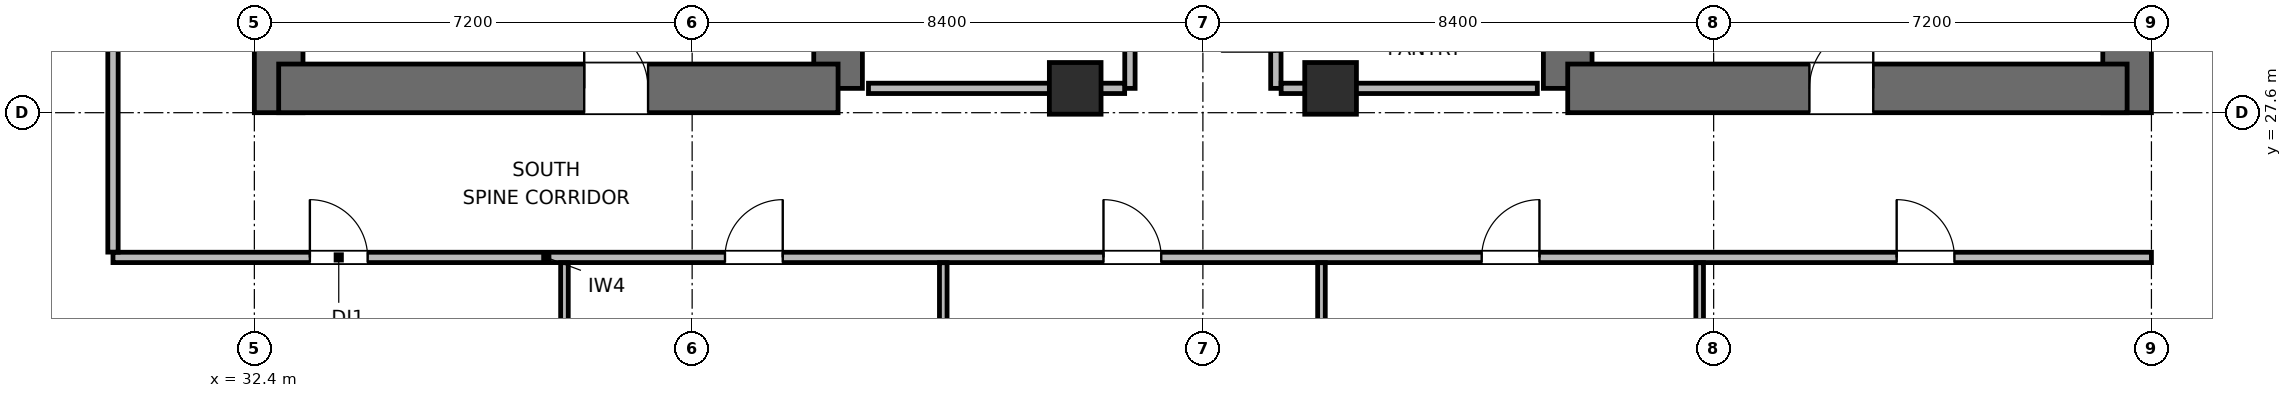
"""IFC4 building model, lengths in metres.
Left out: names, types, materials, properties, quantities, classifications, styles, units other than length and angle.
Written with IfcOpenShell. Run it as: python <this file> out.ifc"""

import sys

from ifc_helpers import new_model, si_unit, direction, frame, frame_2d, origin, origin_2d, place, context, subcontext, project, spatial, rectangle, extrude, element, fill, save


model = new_model("IFC4")
c1 = context("Model", 3, precision=1e-05, world=origin(), true_north=direction((0.0, 1.0)))
c2 = subcontext(c1, "Body", "Model", "MODEL_VIEW")
j1 = project(units=[si_unit("LENGTHUNIT", "METRE"), si_unit("PLANEANGLEUNIT", "RADIAN")], contexts=[c1])
p1 = place(None, origin())
s1 = spatial("IfcSite", under=j1, at=p1, CompositionType="ELEMENT")
p2 = place(p1, origin())
s2 = spatial("IfcBuilding", under=s1, at=p2, CompositionType="ELEMENT")
p3 = place(p2, frame((0.0, 0.0, 154.5)))
s3 = spatial("IfcBuildingStorey", under=s2, at=p3, CompositionType="ELEMENT", Elevation=154.5)
p4 = place(p3, frame((32.8, 27.6, 0.0), z_axis=(0.0, 0.0, 1.0), x_axis=(0.0, 1.0, 0.0)))
e1 = element("IfcWall", 1, at=p4, inside=s3, PredefinedType="SHEAR", context=c2, shape_type="SweptSolid", body=[
    extrude(rectangle(XDim=16.8, YDim=0.8, at=frame_2d((8.4, 0.0))), origin(), (0.0, 0.0, 1.0), 3.9),
])
p5 = place(p3, frame((42.0, 28.0, 0.0), z_axis=(0.0, 0.0, 1.0), x_axis=(0.0, 1.0, 0.0)))
e2 = element("IfcWall", 2, at=p5, inside=s3, PredefinedType="SHEAR", context=c2, shape_type="SweptSolid", body=[
    extrude(rectangle(XDim=6.4, YDim=0.8, at=frame_2d((3.2, 0.0))), origin(), (0.0, 0.0, 1.0), 3.9),
])
p6 = place(p3, frame((32.8, 28.0, 0.0), z_axis=(0.0, 0.0, 1.0), x_axis=(1.0, 0.0, 0.0)))
e3 = element("IfcWall", 3, at=p6, inside=s3, PredefinedType="SHEAR", context=c2, shape_type="SweptSolid", body=[
    extrude(rectangle(XDim=9.2, YDim=0.8, at=frame_2d((4.6, 0.0))), origin(), (0.0, 0.0, 1.0), 3.9),
])
p7 = place(p6, frame((5.025, 0.0, 0.0)))
e4 = element("IfcOpeningElement", 4, at=p7, cuts=e3, PredefinedType="OPENING", context=c2, shape_type="SweptSolid", body=[
    extrude(rectangle(XDim=1.05, YDim=2.04, at=frame_2d((0.525, 1.02))), frame((0.0, 0.41, 0.0), z_axis=(0.0, -1.0, 0.0), x_axis=(1.0, 0.0, 0.0)), (0.0, 0.0, 1.0), 0.82),
])
p8 = place(p3, frame((54.0, 28.0, 0.0), z_axis=(0.0, 0.0, 1.0), x_axis=(0.0, 1.0, 0.0)))
e5 = element("IfcWall", 5, at=p8, inside=s3, PredefinedType="SHEAR", context=c2, shape_type="SweptSolid", body=[
    extrude(rectangle(XDim=7.8, YDim=0.8, at=frame_2d((3.9, 0.0))), origin(), (0.0, 0.0, 1.0), 3.9),
])
p9 = place(p3, frame((63.2, 27.6, 0.0), z_axis=(0.0, 0.0, 1.0), x_axis=(0.0, 1.0, 0.0)))
e6 = element("IfcWall", 6, at=p9, inside=s3, PredefinedType="SHEAR", context=c2, shape_type="SweptSolid", body=[
    extrude(rectangle(XDim=16.8, YDim=0.8, at=frame_2d((8.4, 0.0))), origin(), (0.0, 0.0, 1.0), 3.9),
])
p10 = place(p3, frame((54.0, 28.0, 0.0), z_axis=(0.0, 0.0, 1.0), x_axis=(1.0, 0.0, 0.0)))
e7 = element("IfcWall", 7, at=p10, inside=s3, PredefinedType="SHEAR", context=c2, shape_type="SweptSolid", body=[
    extrude(rectangle(XDim=9.2, YDim=0.8, at=frame_2d((4.6, 0.0))), origin(), (0.0, 0.0, 1.0), 3.9),
])
p11 = place(p10, frame((3.975, 0.0, 0.0)))
e8 = element("IfcOpeningElement", 8, at=p11, cuts=e7, PredefinedType="OPENING", context=c2, shape_type="SweptSolid", body=[
    extrude(rectangle(XDim=1.05, YDim=2.04, at=frame_2d((0.525, 1.02))), frame((0.0, 0.41, 0.0), z_axis=(0.0, -1.0, 0.0), x_axis=(1.0, 0.0, 0.0)), (0.0, 0.0, 1.0), 0.82),
])
for number, where, z_axis, x_axis in (
    (9, (45.9, 28.0, 0.0), (0.0, 0.0, 1.0), (1.0, 0.0, 0.0)),
    (10, (50.1, 28.0, 0.0), (0.0, 0.0, 1.0), (1.0, 0.0, 0.0)),
):
    element("IfcColumn", number, at=place(p3, frame(where, z_axis=z_axis, x_axis=x_axis)), inside=s3, PredefinedType="COLUMN", context=c2, shape_type="SweptSolid", body=[
        extrude(rectangle(XDim=0.85, YDim=0.85, at=origin_2d()), origin(), (0.0, 0.0, 1.0), 3.9),
    ])
p12 = place(p3, frame((46.8, 28.0, 0.0), z_axis=(0.0, 0.0, 1.0), x_axis=(0.0, 1.0, 0.0)))
e11 = element("IfcWall", 11, at=p12, inside=s3, PredefinedType="PARTITIONING", context=c2, shape_type="SweptSolid", body=[
    extrude(rectangle(XDim=4.5, YDim=0.17, at=frame_2d((2.25, 0.0))), origin(), (0.0, 0.0, 1.0), 3.68),
])
p13 = place(p12, frame((1.8, 0.0, 0.0)))
e12 = element("IfcOpeningElement", 12, at=p13, cuts=e11, PredefinedType="OPENING", context=c2, shape_type="SweptSolid", body=[
    extrude(rectangle(XDim=0.9, YDim=2.02, at=frame_2d((0.45, 1.01))), frame((0.0, 0.095, 0.0), z_axis=(0.0, -1.0, 0.0), x_axis=(1.0, 0.0, 0.0)), (0.0, 0.0, 1.0), 0.19),
])
p14 = place(p3, frame((42.5, 28.0, 0.0), z_axis=(0.0, 0.0, 1.0), x_axis=(1.0, 0.0, 0.0)))
e13 = element("IfcWall", 13, at=p14, inside=s3, PredefinedType="PARTITIONING", context=c2, shape_type="SweptSolid", body=[
    extrude(rectangle(XDim=4.213, YDim=0.17, at=frame_2d((2.106, 0.0))), origin(), (0.0, 0.0, 1.0), 2.565),
])
p15 = place(p3, frame((49.2, 28.0, 0.0), z_axis=(0.0, 0.0, 1.0), x_axis=(0.0, 1.0, 0.0)))
e14 = element("IfcWall", 14, at=p15, inside=s3, PredefinedType="PARTITIONING", context=c2, shape_type="SweptSolid", body=[
    extrude(rectangle(XDim=4.5, YDim=0.17, at=frame_2d((2.25, 0.0))), origin(), (0.0, 0.0, 1.0), 3.68),
])
p16 = place(p15, frame((0.605, 0.0, 0.0)))
e15 = element("IfcOpeningElement", 15, at=p16, cuts=e14, PredefinedType="OPENING", context=c2, shape_type="SweptSolid", body=[
    extrude(rectangle(XDim=0.9, YDim=2.02, at=frame_2d((0.45, 1.01))), frame((0.0, 0.095, 0.0), z_axis=(0.0, -1.0, 0.0), x_axis=(1.0, 0.0, 0.0)), (0.0, 0.0, 1.0), 0.19),
])
p17 = place(p15, frame((2.655, 0.0, 0.0)))
e16 = element("IfcOpeningElement", 16, at=p17, cuts=e14, PredefinedType="OPENING", context=c2, shape_type="SweptSolid", body=[
    extrude(rectangle(XDim=0.9, YDim=2.02, at=frame_2d((0.45, 1.01))), frame((0.0, 0.095, 0.0), z_axis=(0.0, -1.0, 0.0), x_axis=(1.0, 0.0, 0.0)), (0.0, 0.0, 1.0), 0.19),
])
p18 = place(p3, frame((49.287, 28.0, 0.0), z_axis=(0.0, 0.0, 1.0), x_axis=(1.0, 0.0, 0.0)))
e17 = element("IfcWall", 17, at=p18, inside=s3, PredefinedType="PARTITIONING", context=c2, shape_type="SweptSolid", body=[
    extrude(rectangle(XDim=4.213, YDim=0.17, at=frame_2d((2.106, 0.0))), origin(), (0.0, 0.0, 1.0), 2.565),
])
p19 = place(p3, frame((30.075, 25.22, 0.0), z_axis=(0.0, 0.0, 1.0), x_axis=(1.0, 0.0, 0.0)))
e18 = element("IfcWall", 18, at=p19, inside=s3, PredefinedType="PARTITIONING", context=c2, shape_type="SweptSolid", body=[
    extrude(rectangle(XDim=33.525, YDim=0.17, at=frame_2d((16.763, 0.0))), origin(), (0.0, 0.0, 1.0), 3.68),
])
p20 = place(p19, frame((3.238, 0.0, 0.0)))
e19 = element("IfcOpeningElement", 19, at=p20, cuts=e18, PredefinedType="OPENING", context=c2, shape_type="SweptSolid", body=[
    extrude(rectangle(XDim=0.95, YDim=2.04, at=frame_2d((0.475, 1.02))), frame((0.0, 0.095, 0.0), z_axis=(0.0, -1.0, 0.0), x_axis=(1.0, 0.0, 0.0)), (0.0, 0.0, 1.0), 0.19),
])
p21 = place(p19, frame((10.065, 0.0, 0.0)))
e20 = element("IfcOpeningElement", 20, at=p21, cuts=e18, PredefinedType="OPENING", context=c2, shape_type="SweptSolid", body=[
    extrude(rectangle(XDim=0.95, YDim=2.04, at=frame_2d((0.475, 1.02))), frame((0.0, 0.095, 0.0), z_axis=(0.0, -1.0, 0.0), x_axis=(1.0, 0.0, 0.0)), (0.0, 0.0, 1.0), 0.19),
])
p22 = place(p19, frame((16.29, 0.0, 0.0)))
e21 = element("IfcOpeningElement", 21, at=p22, cuts=e18, PredefinedType="OPENING", context=c2, shape_type="SweptSolid", body=[
    extrude(rectangle(XDim=0.95, YDim=2.04, at=frame_2d((0.475, 1.02))), frame((0.0, 0.095, 0.0), z_axis=(0.0, -1.0, 0.0), x_axis=(1.0, 0.0, 0.0)), (0.0, 0.0, 1.0), 0.19),
])
p23 = place(p19, frame((22.51, 0.0, 0.0)))
e22 = element("IfcOpeningElement", 22, at=p23, cuts=e18, PredefinedType="OPENING", context=c2, shape_type="SweptSolid", body=[
    extrude(rectangle(XDim=0.95, YDim=2.04, at=frame_2d((0.475, 1.02))), frame((0.0, 0.095, 0.0), z_axis=(0.0, -1.0, 0.0), x_axis=(1.0, 0.0, 0.0)), (0.0, 0.0, 1.0), 0.19),
])
p24 = place(p19, frame((29.335, 0.0, 0.0)))
e23 = element("IfcOpeningElement", 23, at=p24, cuts=e18, PredefinedType="OPENING", context=c2, shape_type="SweptSolid", body=[
    extrude(rectangle(XDim=0.95, YDim=2.04, at=frame_2d((0.475, 1.02))), frame((0.0, 0.095, 0.0), z_axis=(0.0, -1.0, 0.0), x_axis=(1.0, 0.0, 0.0)), (0.0, 0.0, 1.0), 0.19),
])
p25 = place(p3, frame((30.075, 25.307, 0.0), z_axis=(0.0, 0.0, 1.0), x_axis=(0.0, 1.0, 0.0)))
e24 = element("IfcWall", 24, at=p25, inside=s3, PredefinedType="PARTITIONING", context=c2, shape_type="SweptSolid", body=[
    extrude(rectangle(XDim=9.093, YDim=0.17, at=frame_2d((4.546, 0.0))), origin(), (0.0, 0.0, 1.0), 3.68),
])
p26 = place(p25, frame((4.028, 0.0, 0.0)))
e25 = element("IfcOpeningElement", 25, at=p26, cuts=e24, PredefinedType="OPENING", context=c2, shape_type="SweptSolid", body=[
    extrude(rectangle(XDim=0.95, YDim=2.04, at=frame_2d((0.475, 1.02))), frame((0.0, 0.095, 0.0), z_axis=(0.0, -1.0, 0.0), x_axis=(1.0, 0.0, 0.0)), (0.0, 0.0, 1.0), 0.19),
])
p27 = place(p3, frame((37.5, 18.875, 0.0), z_axis=(0.0, 0.0, 1.0), x_axis=(0.0, 1.0, 0.0)))
e26 = element("IfcWall", 26, at=p27, inside=s3, PredefinedType="PARTITIONING", context=c2, shape_type="SweptSolid", body=[
    extrude(rectangle(XDim=6.258, YDim=0.125, at=frame_2d((3.129, 0.0))), origin(), (0.0, 0.0, 1.0), 3.68),
])
p28 = place(p3, frame((43.73, 22.555, 0.0), z_axis=(0.0, 0.0, 1.0), x_axis=(0.0, 1.0, 0.0)))
e27 = element("IfcWall", 27, at=p28, inside=s3, PredefinedType="PARTITIONING", context=c2, shape_type="SweptSolid", body=[
    extrude(rectangle(XDim=2.578, YDim=0.125, at=frame_2d((1.289, 0.0))), origin(), (0.0, 0.0, 1.0), 3.043),
])
p29 = place(p3, frame((49.95, 20.475, 0.0), z_axis=(0.0, 0.0, 1.0), x_axis=(0.0, 1.0, 0.0)))
e28 = element("IfcWall", 28, at=p29, inside=s3, PredefinedType="PARTITIONING", context=c2, shape_type="SweptSolid", body=[
    extrude(rectangle(XDim=4.658, YDim=0.125, at=frame_2d((2.329, 0.0))), origin(), (0.0, 0.0, 1.0), 3.68),
])
p30 = place(p3, frame((56.17, 18.875, 0.0), z_axis=(0.0, 0.0, 1.0), x_axis=(0.0, 1.0, 0.0)))
e29 = element("IfcWall", 29, at=p30, inside=s3, PredefinedType="PARTITIONING", context=c2, shape_type="SweptSolid", body=[
    extrude(rectangle(XDim=6.258, YDim=0.125, at=frame_2d((3.129, 0.0))), origin(), (0.0, 0.0, 1.0), 3.043),
])
p31 = place(p7, origin())
e30 = element("IfcDoor", 30, at=p31, inside=s3, OperationType="SINGLE_SWING_LEFT", PredefinedType="DOOR", context=c2, shape_type="SweptSolid", body=[
    extrude(rectangle(XDim=1.05, YDim=2.04, at=frame_2d((0.525, 1.02))), frame((0.0, 0.025, 0.0), z_axis=(0.0, -1.0, 0.0), x_axis=(1.0, 0.0, 0.0)), (0.0, 0.0, 1.0), 0.05),
])
fill(e4, e30)
p32 = place(p11, origin())
e31 = element("IfcDoor", 31, at=p32, inside=s3, OperationType="SINGLE_SWING_RIGHT", PredefinedType="DOOR", context=c2, shape_type="SweptSolid", body=[
    extrude(rectangle(XDim=1.05, YDim=2.04, at=frame_2d((0.525, 1.02))), frame((0.0, 0.025, 0.0), z_axis=(0.0, -1.0, 0.0), x_axis=(1.0, 0.0, 0.0)), (0.0, 0.0, 1.0), 0.05),
])
fill(e8, e31)
p33 = place(p20, origin())
e32 = element("IfcDoor", 32, at=p33, inside=s3, OperationType="SINGLE_SWING_LEFT", PredefinedType="DOOR", context=c2, shape_type="SweptSolid", body=[
    extrude(rectangle(XDim=0.95, YDim=2.04, at=frame_2d((0.475, 1.02))), frame((0.0, 0.025, 0.0), z_axis=(0.0, -1.0, 0.0), x_axis=(1.0, 0.0, 0.0)), (0.0, 0.0, 1.0), 0.05),
])
fill(e19, e32)
p34 = place(p21, origin())
e33 = element("IfcDoor", 33, at=p34, inside=s3, OperationType="SINGLE_SWING_RIGHT", PredefinedType="DOOR", context=c2, shape_type="SweptSolid", body=[
    extrude(rectangle(XDim=0.95, YDim=2.04, at=frame_2d((0.475, 1.02))), frame((0.0, 0.025, 0.0), z_axis=(0.0, -1.0, 0.0), x_axis=(1.0, 0.0, 0.0)), (0.0, 0.0, 1.0), 0.05),
])
fill(e20, e33)
p35 = place(p22, origin())
e34 = element("IfcDoor", 34, at=p35, inside=s3, OperationType="SINGLE_SWING_LEFT", PredefinedType="DOOR", context=c2, shape_type="SweptSolid", body=[
    extrude(rectangle(XDim=0.95, YDim=2.04, at=frame_2d((0.475, 1.02))), frame((0.0, 0.025, 0.0), z_axis=(0.0, -1.0, 0.0), x_axis=(1.0, 0.0, 0.0)), (0.0, 0.0, 1.0), 0.05),
])
fill(e21, e34)
p36 = place(p23, origin())
e35 = element("IfcDoor", 35, at=p36, inside=s3, OperationType="SINGLE_SWING_RIGHT", PredefinedType="DOOR", context=c2, shape_type="SweptSolid", body=[
    extrude(rectangle(XDim=0.95, YDim=2.04, at=frame_2d((0.475, 1.02))), frame((0.0, 0.025, 0.0), z_axis=(0.0, -1.0, 0.0), x_axis=(1.0, 0.0, 0.0)), (0.0, 0.0, 1.0), 0.05),
])
fill(e22, e35)
p37 = place(p24, origin())
e36 = element("IfcDoor", 36, at=p37, inside=s3, OperationType="SINGLE_SWING_LEFT", PredefinedType="DOOR", context=c2, shape_type="SweptSolid", body=[
    extrude(rectangle(XDim=0.95, YDim=2.04, at=frame_2d((0.475, 1.02))), frame((0.0, 0.025, 0.0), z_axis=(0.0, -1.0, 0.0), x_axis=(1.0, 0.0, 0.0)), (0.0, 0.0, 1.0), 0.05),
])
fill(e23, e36)
save(model, sys.argv[1])
